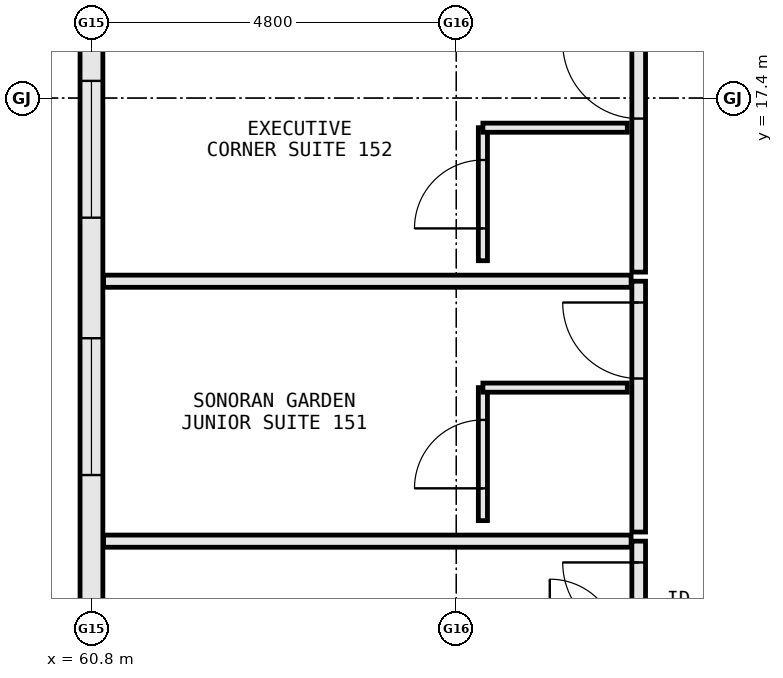
"""IFC4 building model, lengths in metres.
Left out: names, types, materials, properties, quantities, classifications, styles, units other than length and angle.
Written with IfcOpenShell. Run it as: python <this file> out.ifc"""

import sys

from ifc_helpers import new_model, si_unit, direction, frame, frame_2d, origin, place, context, subcontext, project, spatial, rectangle, extrude, element, fill, save


model = new_model("IFC4")
c1 = context("Model", 3, precision=1e-05, world=origin(), true_north=direction((0.0, 1.0)))
c2 = subcontext(c1, "Body", "Model", "MODEL_VIEW")
j1 = project(units=[si_unit("LENGTHUNIT", "METRE"), si_unit("PLANEANGLEUNIT", "RADIAN")], contexts=[c1])
p1 = place(None, origin())
s1 = spatial("IfcSite", under=j1, at=p1, CompositionType="ELEMENT")
p2 = place(p1, origin())
s2 = spatial("IfcBuilding", under=s1, at=p2, CompositionType="ELEMENT")
p3 = place(p2, frame((0.0, 0.0, 23.8)))
s3 = spatial("IfcBuildingStorey", under=s2, at=p3, CompositionType="ELEMENT", Elevation=23.8)
p4 = place(p3, frame((60.8, 18.342, 0.0), z_axis=(0.0, 0.0, 1.0), x_axis=(0.0, -1.0, 0.0)))
e1 = element("IfcWall", 1, at=p4, inside=s3, PredefinedType="STANDARD", context=c2, shape_type="SweptSolid", body=[
    extrude(rectangle(XDim=7.884, YDim=0.3, at=frame_2d((3.942, 0.0))), origin(), (0.0, 0.0, 1.0), 3.005),
])
p5 = place(p4, frame((4.102, 0.0, 0.85)))
e2 = element("IfcOpeningElement", 2, at=p5, cuts=e1, PredefinedType="OPENING", context=c2, shape_type="SweptSolid", body=[
    extrude(rectangle(XDim=1.8, YDim=1.85, at=frame_2d((0.9, 0.925))), frame((0.0, 0.162, 0.0), z_axis=(0.0, -1.0, 0.0), x_axis=(1.0, 0.0, 0.0)), (0.0, 0.0, 1.0), 0.324),
])
p6 = place(p4, frame((0.716, 0.0, 0.85)))
e3 = element("IfcOpeningElement", 3, at=p6, cuts=e1, PredefinedType="OPENING", context=c2, shape_type="SweptSolid", body=[
    extrude(rectangle(XDim=1.8, YDim=1.85, at=frame_2d((0.9, 0.925))), frame((0.0, 0.162, 0.0), z_axis=(0.0, -1.0, 0.0), x_axis=(1.0, 0.0, 0.0)), (0.0, 0.0, 1.0), 0.324),
])
p7 = place(p3, frame((68.0, 8.27, 0.0), z_axis=(0.0, 0.0, 1.0), x_axis=(0.0, 1.0, 0.0)))
e4 = element("IfcWall", 4, at=p7, inside=s3, PredefinedType="PARTITIONING", context=c2, shape_type="SweptSolid", body=[
    extrude(rectangle(XDim=3.3, YDim=0.18, at=frame_2d((1.65, 0.0))), origin(), (0.0, 0.0, 1.0), 3.55),
])
p8 = place(p7, frame((2.02, 0.0, 0.0)))
e5 = element("IfcOpeningElement", 5, at=p8, cuts=e4, PredefinedType="OPENING", context=c2, shape_type="SweptSolid", body=[
    extrude(rectangle(XDim=1.0, YDim=2.2, at=frame_2d((0.5, 1.1))), frame((0.0, 0.102, 0.0), z_axis=(0.0, -1.0, 0.0), x_axis=(1.0, 0.0, 0.0)), (0.0, 0.0, 1.0), 0.204),
])
p9 = place(p3, frame((60.96, 11.57, 0.0), z_axis=(0.0, 0.0, 1.0), x_axis=(1.0, 0.0, 0.0)))
e6 = element("IfcWall", 6, at=p9, inside=s3, PredefinedType="PARTITIONING", context=c2, shape_type="SweptSolid", body=[
    extrude(rectangle(XDim=6.94, YDim=0.16, at=frame_2d((3.47, 0.0))), origin(), (0.0, 0.0, 1.0), 3.55),
])
p10 = place(p3, frame((68.0, 11.69, 0.0), z_axis=(0.0, 0.0, 1.0), x_axis=(0.0, 1.0, 0.0)))
e7 = element("IfcWall", 7, at=p10, inside=s3, PredefinedType="PARTITIONING", context=c2, shape_type="SweptSolid", body=[
    extrude(rectangle(XDim=3.3, YDim=0.18, at=frame_2d((1.65, 0.0))), origin(), (0.0, 0.0, 1.0), 3.55),
])
p11 = place(p10, frame((2.02, 0.0, 0.0)))
e8 = element("IfcOpeningElement", 8, at=p11, cuts=e7, PredefinedType="OPENING", context=c2, shape_type="SweptSolid", body=[
    extrude(rectangle(XDim=1.0, YDim=2.2, at=frame_2d((0.5, 1.1))), frame((0.0, 0.102, 0.0), z_axis=(0.0, -1.0, 0.0), x_axis=(1.0, 0.0, 0.0)), (0.0, 0.0, 1.0), 0.204),
])
p12 = place(p3, frame((60.96, 14.99, 0.0), z_axis=(0.0, 0.0, 1.0), x_axis=(1.0, 0.0, 0.0)))
e9 = element("IfcWall", 9, at=p12, inside=s3, PredefinedType="PARTITIONING", context=c2, shape_type="SweptSolid", body=[
    extrude(rectangle(XDim=6.94, YDim=0.16, at=frame_2d((3.47, 0.0))), origin(), (0.0, 0.0, 1.0), 3.55),
])
p13 = place(p3, frame((65.95, 11.84, 0.0), z_axis=(0.0, 0.0, 1.0), x_axis=(0.0, 1.0, 0.0)))
e10 = element("IfcWall", 10, at=p13, inside=s3, PredefinedType="PARTITIONING", context=c2, shape_type="SweptSolid", body=[
    extrude(rectangle(XDim=1.75, YDim=0.12, at=frame_2d((0.875, 0.0))), origin(), (0.0, 0.0, 1.0), 3.005),
])
p14 = place(p13, frame((0.425, 0.0, 0.0)))
e11 = element("IfcOpeningElement", 11, at=p14, cuts=e10, PredefinedType="OPENING", context=c2, shape_type="SweptSolid", body=[
    extrude(rectangle(XDim=0.9, YDim=2.15, at=frame_2d((0.45, 1.075))), frame((0.0, 0.072, 0.0), z_axis=(0.0, -1.0, 0.0), x_axis=(1.0, 0.0, 0.0)), (0.0, 0.0, 1.0), 0.144),
])
p15 = place(p3, frame((65.95, 13.59, 0.0), z_axis=(0.0, 0.0, 1.0), x_axis=(1.0, 0.0, 0.0)))
e12 = element("IfcWall", 12, at=p15, inside=s3, PredefinedType="PARTITIONING", context=c2, shape_type="SweptSolid", body=[
    extrude(rectangle(XDim=1.9, YDim=0.12, at=frame_2d((0.95, 0.0))), origin(), (0.0, 0.0, 1.0), 3.55),
])
p16 = place(p3, frame((68.0, 15.11, 0.0), z_axis=(0.0, 0.0, 1.0), x_axis=(0.0, 1.0, 0.0)))
e13 = element("IfcWall", 13, at=p16, inside=s3, PredefinedType="PARTITIONING", context=c2, shape_type="SweptSolid", body=[
    extrude(rectangle(XDim=3.3, YDim=0.18, at=frame_2d((1.65, 0.0))), origin(), (0.0, 0.0, 1.0), 3.55),
])
p17 = place(p16, frame((2.02, 0.0, 0.0)))
e14 = element("IfcOpeningElement", 14, at=p17, cuts=e13, PredefinedType="OPENING", context=c2, shape_type="SweptSolid", body=[
    extrude(rectangle(XDim=1.0, YDim=2.2, at=frame_2d((0.5, 1.1))), frame((0.0, 0.102, 0.0), z_axis=(0.0, -1.0, 0.0), x_axis=(1.0, 0.0, 0.0)), (0.0, 0.0, 1.0), 0.204),
])
p18 = place(p3, frame((65.95, 15.26, 0.0), z_axis=(0.0, 0.0, 1.0), x_axis=(0.0, 1.0, 0.0)))
e15 = element("IfcWall", 15, at=p18, inside=s3, PredefinedType="PARTITIONING", context=c2, shape_type="SweptSolid", body=[
    extrude(rectangle(XDim=1.75, YDim=0.12, at=frame_2d((0.875, 0.0))), origin(), (0.0, 0.0, 1.0), 3.005),
])
p19 = place(p18, frame((0.425, 0.0, 0.0)))
e16 = element("IfcOpeningElement", 16, at=p19, cuts=e15, PredefinedType="OPENING", context=c2, shape_type="SweptSolid", body=[
    extrude(rectangle(XDim=0.9, YDim=2.15, at=frame_2d((0.45, 1.075))), frame((0.0, 0.072, 0.0), z_axis=(0.0, -1.0, 0.0), x_axis=(1.0, 0.0, 0.0)), (0.0, 0.0, 1.0), 0.144),
])
p20 = place(p3, frame((65.95, 17.01, 0.0), z_axis=(0.0, 0.0, 1.0), x_axis=(1.0, 0.0, 0.0)))
e17 = element("IfcWall", 17, at=p20, inside=s3, PredefinedType="PARTITIONING", context=c2, shape_type="SweptSolid", body=[
    extrude(rectangle(XDim=1.9, YDim=0.12, at=frame_2d((0.95, 0.0))), origin(), (0.0, 0.0, 1.0), 3.55),
])
p21 = place(p5, origin())
e18 = element("IfcWindow", 18, at=p21, inside=s3, PartitioningType="SINGLE_PANEL", PredefinedType="WINDOW", context=c2, shape_type="SweptSolid", body=[
    extrude(rectangle(XDim=1.8, YDim=1.85, at=frame_2d((0.9, 0.925))), frame((0.0, 0.03, 0.0), z_axis=(0.0, -1.0, 0.0), x_axis=(1.0, 0.0, 0.0)), (0.0, 0.0, 1.0), 0.06),
])
fill(e2, e18)
p22 = place(p6, origin())
e19 = element("IfcWindow", 19, at=p22, inside=s3, PartitioningType="SINGLE_PANEL", PredefinedType="WINDOW", context=c2, shape_type="SweptSolid", body=[
    extrude(rectangle(XDim=1.8, YDim=1.85, at=frame_2d((0.9, 0.925))), frame((0.0, 0.03, 0.0), z_axis=(0.0, -1.0, 0.0), x_axis=(1.0, 0.0, 0.0)), (0.0, 0.0, 1.0), 0.06),
])
fill(e3, e19)
p23 = place(p8, origin())
e20 = element("IfcDoor", 20, at=p23, inside=s3, OperationType="SINGLE_SWING_RIGHT", PredefinedType="DOOR", context=c2, shape_type="SweptSolid", body=[
    extrude(rectangle(XDim=1.0, YDim=2.2, at=frame_2d((0.5, 1.1))), frame((0.0, 0.025, 0.0), z_axis=(0.0, -1.0, 0.0), x_axis=(1.0, 0.0, 0.0)), (0.0, 0.0, 1.0), 0.05),
])
fill(e5, e20)
p24 = place(p11, origin())
e21 = element("IfcDoor", 21, at=p24, inside=s3, OperationType="SINGLE_SWING_RIGHT", PredefinedType="DOOR", context=c2, shape_type="SweptSolid", body=[
    extrude(rectangle(XDim=1.0, YDim=2.2, at=frame_2d((0.5, 1.1))), frame((0.0, 0.025, 0.0), z_axis=(0.0, -1.0, 0.0), x_axis=(1.0, 0.0, 0.0)), (0.0, 0.0, 1.0), 0.05),
])
fill(e8, e21)
p25 = place(p14, origin())
e22 = element("IfcDoor", 22, at=p25, inside=s3, OperationType="SINGLE_SWING_LEFT", PredefinedType="DOOR", context=c2, shape_type="SweptSolid", body=[
    extrude(rectangle(XDim=0.9, YDim=2.15, at=frame_2d((0.45, 1.075))), frame((0.0, 0.025, 0.0), z_axis=(0.0, -1.0, 0.0), x_axis=(1.0, 0.0, 0.0)), (0.0, 0.0, 1.0), 0.05),
])
fill(e11, e22)
p26 = place(p17, origin())
e23 = element("IfcDoor", 23, at=p26, inside=s3, OperationType="SINGLE_SWING_RIGHT", PredefinedType="DOOR", context=c2, shape_type="SweptSolid", body=[
    extrude(rectangle(XDim=1.0, YDim=2.2, at=frame_2d((0.5, 1.1))), frame((0.0, 0.025, 0.0), z_axis=(0.0, -1.0, 0.0), x_axis=(1.0, 0.0, 0.0)), (0.0, 0.0, 1.0), 0.05),
])
fill(e14, e23)
p27 = place(p19, origin())
e24 = element("IfcDoor", 24, at=p27, inside=s3, OperationType="SINGLE_SWING_LEFT", PredefinedType="DOOR", context=c2, shape_type="SweptSolid", body=[
    extrude(rectangle(XDim=0.9, YDim=2.15, at=frame_2d((0.45, 1.075))), frame((0.0, 0.025, 0.0), z_axis=(0.0, -1.0, 0.0), x_axis=(1.0, 0.0, 0.0)), (0.0, 0.0, 1.0), 0.05),
])
fill(e16, e24)
save(model, sys.argv[1])
